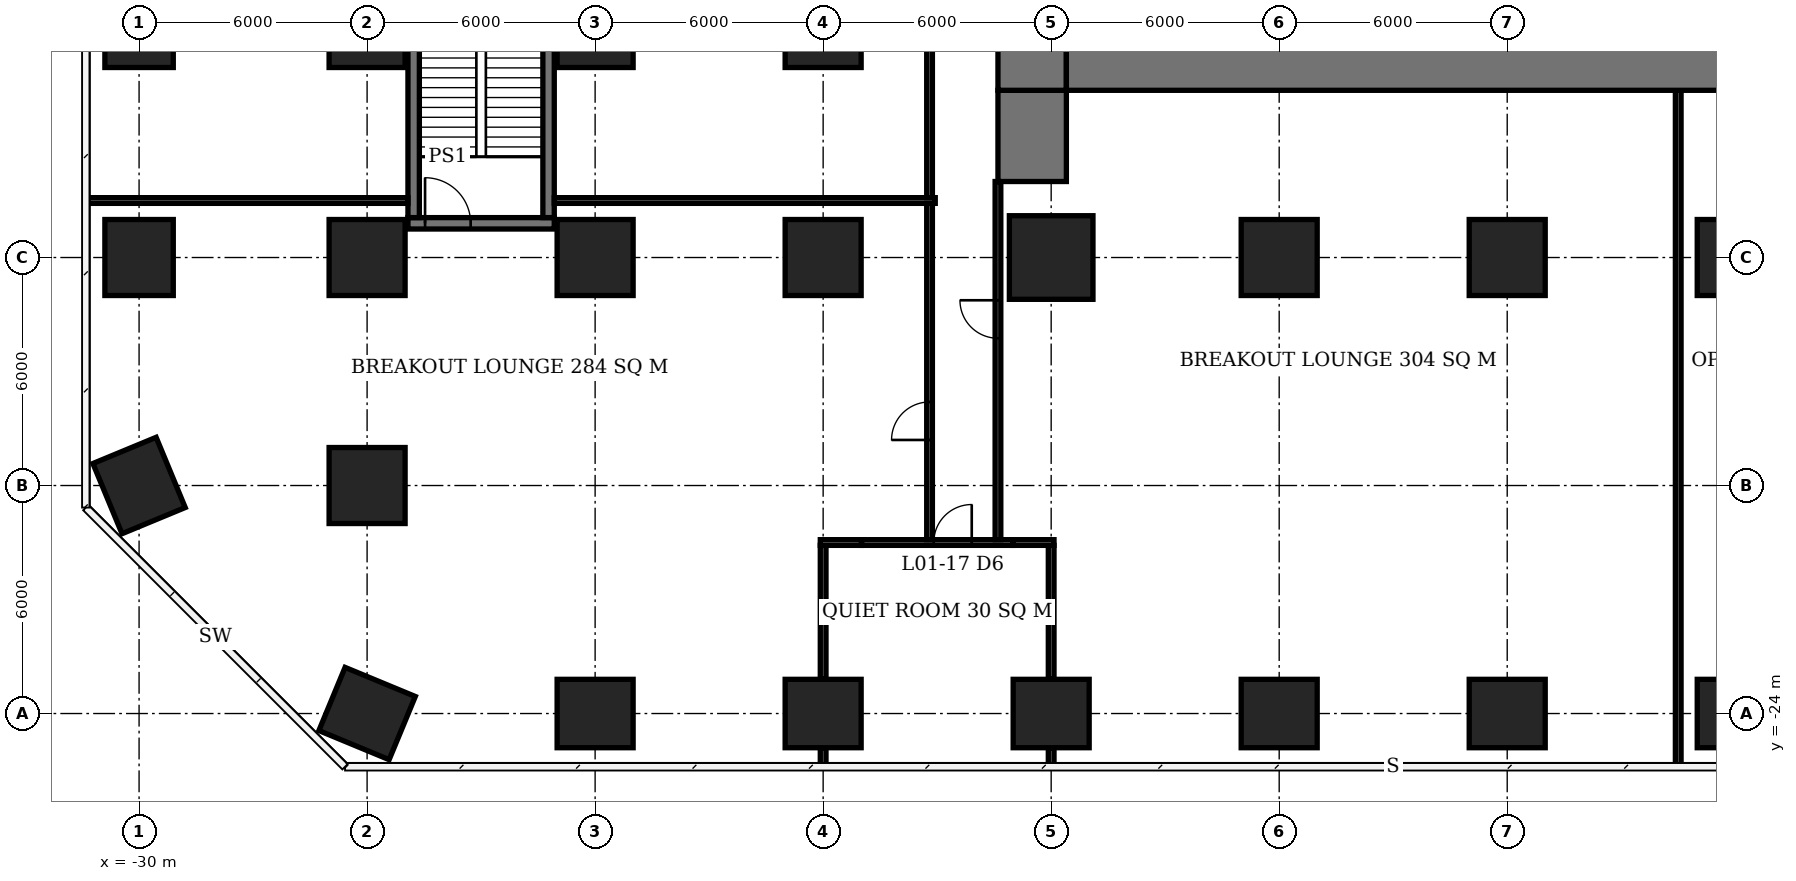
"""IFC4 building model, lengths in metres.
Left out: names, types, materials, properties, quantities, classifications, styles, units other than length and angle.
Written with IfcOpenShell. Run it as: python <this file> out.ifc"""

import sys

from ifc_helpers import new_model, si_unit, direction, frame, frame_2d, origin, origin_2d, place, context, subcontext, project, spatial, rectangle, extrude, element, fill, save


model = new_model("IFC4")
c1 = context("Model", 3, precision=1e-05, world=origin(), true_north=direction((0.0, 1.0)))
c2 = subcontext(c1, "Body", "Model", "MODEL_VIEW")
j1 = project(units=[si_unit("LENGTHUNIT", "METRE"), si_unit("PLANEANGLEUNIT", "RADIAN")], contexts=[c1])
p1 = place(None, origin())
s1 = spatial("IfcSite", under=j1, at=p1, CompositionType="ELEMENT")
p2 = place(p1, origin())
s2 = spatial("IfcBuilding", under=s1, at=p2, CompositionType="ELEMENT")
p3 = place(p2, frame((0.0, 0.0, 6.0)))
s3 = spatial("IfcBuildingStorey", under=s2, at=p3, CompositionType="ELEMENT", Elevation=6.0)
for number, where, z_axis, x_axis in (
    (1, (-30.0, -18.0, 0.0), (0.0, 0.0, 1.0), (-0.383, 0.924, 0.0)),
    (2, (-30.0, -12.0, 0.0), (0.0, 0.0, 1.0), (0.0, 1.0, 0.0)),
    (3, (-30.0, -6.0, 0.0), (0.0, 0.0, 1.0), (0.0, 1.0, 0.0)),
    (4, (-24.0, -24.0, 0.0), (0.0, 0.0, 1.0), (-0.924, 0.383, 0.0)),
):
    element("IfcColumn", number, at=place(p3, frame(where, z_axis=z_axis, x_axis=x_axis)), inside=s3, PredefinedType="COLUMN", context=c2, shape_type="SweptSolid", body=[
        extrude(rectangle(XDim=2.0, YDim=1.8, at=origin_2d()), origin(), (0.0, 0.0, 1.0), 5.0),
    ])
for number, where, z_axis, x_axis in (
    (5, (-24.0, -18.0, 0.0), (0.0, 0.0, 1.0), (1.0, 0.0, 0.0)),
    (6, (-24.0, -12.0, 0.0), (0.0, 0.0, 1.0), (1.0, 0.0, 0.0)),
    (7, (-24.0, -6.0, 0.0), (0.0, 0.0, 1.0), (1.0, 0.0, 0.0)),
):
    element("IfcColumn", number, at=place(p3, frame(where, z_axis=z_axis, x_axis=x_axis)), inside=s3, PredefinedType="COLUMN", context=c2, shape_type="SweptSolid", body=[
        extrude(rectangle(XDim=2.0, YDim=2.0, at=origin_2d()), origin(), (0.0, 0.0, 1.0), 5.0),
    ])
p4 = place(p3, frame((-18.0, -24.0, 0.0), z_axis=(0.0, 0.0, 1.0), x_axis=(1.0, 0.0, 0.0)))
e8 = element("IfcColumn", 8, at=p4, inside=s3, PredefinedType="COLUMN", context=c2, shape_type="SweptSolid", body=[
    extrude(rectangle(XDim=2.0, YDim=1.8, at=origin_2d()), origin(), (0.0, 0.0, 1.0), 5.0),
])
for number, where, z_axis, x_axis in (
    (9, (-18.0, -12.0, 0.0), (0.0, 0.0, 1.0), (1.0, 0.0, 0.0)),
    (10, (-18.0, -6.0, 0.0), (0.0, 0.0, 1.0), (1.0, 0.0, 0.0)),
):
    element("IfcColumn", number, at=place(p3, frame(where, z_axis=z_axis, x_axis=x_axis)), inside=s3, PredefinedType="COLUMN", context=c2, shape_type="SweptSolid", body=[
        extrude(rectangle(XDim=2.0, YDim=2.0, at=origin_2d()), origin(), (0.0, 0.0, 1.0), 5.0),
    ])
p5 = place(p3, frame((-12.0, -24.0, 0.0), z_axis=(0.0, 0.0, 1.0), x_axis=(1.0, 0.0, 0.0)))
e11 = element("IfcColumn", 11, at=p5, inside=s3, PredefinedType="COLUMN", context=c2, shape_type="SweptSolid", body=[
    extrude(rectangle(XDim=2.0, YDim=1.8, at=origin_2d()), origin(), (0.0, 0.0, 1.0), 5.0),
])
for number, where, z_axis, x_axis in (
    (12, (-12.0, -12.0, 0.0), (0.0, 0.0, 1.0), (1.0, 0.0, 0.0)),
    (13, (-12.0, -6.0, 0.0), (0.0, 0.0, 1.0), (1.0, 0.0, 0.0)),
):
    element("IfcColumn", number, at=place(p3, frame(where, z_axis=z_axis, x_axis=x_axis)), inside=s3, PredefinedType="COLUMN", context=c2, shape_type="SweptSolid", body=[
        extrude(rectangle(XDim=2.0, YDim=2.0, at=origin_2d()), origin(), (0.0, 0.0, 1.0), 5.0),
    ])
p6 = place(p3, frame((-6.0, -24.0, 0.0), z_axis=(0.0, 0.0, 1.0), x_axis=(1.0, 0.0, 0.0)))
e14 = element("IfcColumn", 14, at=p6, inside=s3, PredefinedType="COLUMN", context=c2, shape_type="SweptSolid", body=[
    extrude(rectangle(XDim=2.0, YDim=1.8, at=origin_2d()), origin(), (0.0, 0.0, 1.0), 5.0),
])
p7 = place(p3, frame((-6.0, -12.0, 0.0), z_axis=(0.0, 0.0, 1.0), x_axis=(1.0, 0.0, 0.0)))
e15 = element("IfcColumn", 15, at=p7, inside=s3, PredefinedType="COLUMN", context=c2, shape_type="SweptSolid", body=[
    extrude(rectangle(XDim=2.2, YDim=2.2, at=origin_2d()), origin(), (0.0, 0.0, 1.0), 5.0),
])
p8 = place(p3, frame((0.0, -24.0, 0.0), z_axis=(0.0, 0.0, 1.0), x_axis=(1.0, 0.0, 0.0)))
e16 = element("IfcColumn", 16, at=p8, inside=s3, PredefinedType="COLUMN", context=c2, shape_type="SweptSolid", body=[
    extrude(rectangle(XDim=2.0, YDim=1.8, at=origin_2d()), origin(), (0.0, 0.0, 1.0), 5.0),
])
p9 = place(p3, frame((0.0, -12.0, 0.0), z_axis=(0.0, 0.0, 1.0), x_axis=(1.0, 0.0, 0.0)))
e17 = element("IfcColumn", 17, at=p9, inside=s3, PredefinedType="COLUMN", context=c2, shape_type="SweptSolid", body=[
    extrude(rectangle(XDim=2.0, YDim=2.0, at=origin_2d()), origin(), (0.0, 0.0, 1.0), 5.0),
])
p10 = place(p3, frame((6.0, -24.0, 0.0), z_axis=(0.0, 0.0, 1.0), x_axis=(1.0, 0.0, 0.0)))
e18 = element("IfcColumn", 18, at=p10, inside=s3, PredefinedType="COLUMN", context=c2, shape_type="SweptSolid", body=[
    extrude(rectangle(XDim=2.0, YDim=1.8, at=origin_2d()), origin(), (0.0, 0.0, 1.0), 5.0),
])
p11 = place(p3, frame((6.0, -12.0, 0.0), z_axis=(0.0, 0.0, 1.0), x_axis=(1.0, 0.0, 0.0)))
e19 = element("IfcColumn", 19, at=p11, inside=s3, PredefinedType="COLUMN", context=c2, shape_type="SweptSolid", body=[
    extrude(rectangle(XDim=2.0, YDim=2.0, at=origin_2d()), origin(), (0.0, 0.0, 1.0), 5.0),
])
p12 = place(p3, frame((12.0, -24.0, 0.0), z_axis=(0.0, 0.0, 1.0), x_axis=(1.0, 0.0, 0.0)))
e20 = element("IfcColumn", 20, at=p12, inside=s3, PredefinedType="COLUMN", context=c2, shape_type="SweptSolid", body=[
    extrude(rectangle(XDim=2.0, YDim=1.8, at=origin_2d()), origin(), (0.0, 0.0, 1.0), 5.0),
])
p13 = place(p3, frame((12.0, -12.0, 0.0), z_axis=(0.0, 0.0, 1.0), x_axis=(1.0, 0.0, 0.0)))
e21 = element("IfcColumn", 21, at=p13, inside=s3, PredefinedType="COLUMN", context=c2, shape_type="SweptSolid", body=[
    extrude(rectangle(XDim=2.0, YDim=2.0, at=origin_2d()), origin(), (0.0, 0.0, 1.0), 5.0),
])
p14 = place(p3, frame((-5.6, -6.6, 0.0), z_axis=(0.0, 0.0, 1.0), x_axis=(1.0, 0.0, 0.0)))
e22 = element("IfcWall", 22, at=p14, inside=s3, PredefinedType="SHEAR", context=c2, shape_type="SweptSolid", body=[
    extrude(rectangle(XDim=23.2, YDim=2.0, at=frame_2d((11.6, 0.0))), origin(), (0.0, 0.0, 1.0), 5.0),
])
p15 = place(p3, frame((-6.5, -7.6, 0.0), z_axis=(0.0, 0.0, 1.0), x_axis=(0.0, 1.0, 0.0)))
e23 = element("IfcWall", 23, at=p15, inside=s3, PredefinedType="SHEAR", context=c2, shape_type="SweptSolid", body=[
    extrude(rectangle(XDim=21.2, YDim=1.8, at=frame_2d((10.6, 0.0))), origin(), (0.0, 0.0, 1.0), 5.0),
])
p16 = place(p15, frame((7.8, 0.0, 0.0)))
e24 = element("IfcOpeningElement", 24, at=p16, cuts=e23, PredefinedType="OPENING", context=c2, shape_type="SweptSolid", body=[
    extrude(rectangle(XDim=1.8, YDim=2.4, at=frame_2d((0.9, 1.2))), frame((0.0, 0.91, 0.0), z_axis=(0.0, -1.0, 0.0), x_axis=(1.0, 0.0, 0.0)), (0.0, 0.0, 1.0), 1.82),
])
p17 = place(p3, frame((-6.5, -10.0, 0.0), z_axis=(0.0, 0.0, 1.0), x_axis=(0.0, 1.0, 0.0)))
e25 = element("IfcWall", 25, at=p17, inside=s3, PredefinedType="SHEAR", context=c2, shape_type="SweptSolid", body=[
    extrude(rectangle(XDim=2.4, YDim=1.8, at=frame_2d((1.2, 0.0))), origin(), (0.0, 0.0, 1.0), 5.0),
])
p18 = place(p3, frame((-22.925, -11.1, 0.0), z_axis=(0.0, 0.0, 1.0), x_axis=(1.0, 0.0, 0.0)))
e26 = element("IfcWall", 26, at=p18, inside=s3, PredefinedType="SOLIDWALL", context=c2, shape_type="SweptSolid", body=[
    extrude(rectangle(XDim=3.85, YDim=0.3, at=frame_2d((1.925, 0.0))), origin(), (0.0, 0.0, 1.0), 4.75),
])
p19 = place(p18, frame((0.45, 0.0, 0.0)))
e27 = element("IfcOpeningElement", 27, at=p19, cuts=e26, PredefinedType="OPENING", context=c2, shape_type="SweptSolid", body=[
    extrude(rectangle(XDim=1.2, YDim=2.1, at=frame_2d((0.6, 1.05))), frame((0.0, 0.16, 0.0), z_axis=(0.0, -1.0, 0.0), x_axis=(1.0, 0.0, 0.0)), (0.0, 0.0, 1.0), 0.32),
])
for number, where, z_axis, x_axis in (
    (28, (-22.775, -10.95, 0.0), (0.0, 0.0, 1.0), (0.0, 1.0, 0.0)),
    (29, (-19.225, -10.95, 0.0), (0.0, 0.0, 1.0), (0.0, 1.0, 0.0)),
):
    element("IfcWall", number, at=place(p3, frame(where, z_axis=z_axis, x_axis=x_axis)), inside=s3, PredefinedType="SOLIDWALL", context=c2, shape_type="SweptSolid", body=[
        extrude(rectangle(XDim=9.9, YDim=0.3, at=frame_2d((4.95, 0.0))), origin(), (0.0, 0.0, 1.0), 4.75),
    ])
p20 = place(p3, frame((-12.075, -19.5, 0.0), z_axis=(0.0, 0.0, 1.0), x_axis=(1.0, 0.0, 0.0)))
e30 = element("IfcWall", 30, at=p20, inside=s3, PredefinedType="PARTITIONING", context=c2, shape_type="SweptSolid", body=[
    extrude(rectangle(XDim=1.085, YDim=0.15, at=frame_2d((0.542, 0.0))), origin(), (0.0, 0.0, 1.0), 3.75),
])
p21 = place(p3, frame((-10.99, -19.5, 0.0), z_axis=(0.0, 0.0, 1.0), x_axis=(1.0, 0.0, 0.0)))
e31 = element("IfcWall", 31, at=p21, inside=s3, PredefinedType="PARTITIONING", context=c2, shape_type="SweptSolid", body=[
    extrude(rectangle(XDim=3.98, YDim=0.15, at=frame_2d((1.99, 0.0))), origin(), (0.0, 0.0, 1.0), 4.75),
])
p22 = place(p21, frame((1.9, 0.0, 0.0)))
e32 = element("IfcOpeningElement", 32, at=p22, cuts=e31, PredefinedType="OPENING", context=c2, shape_type="SweptSolid", body=[
    extrude(rectangle(XDim=1.0, YDim=2.1, at=frame_2d((0.5, 1.05))), frame((0.0, 0.085, 0.0), z_axis=(0.0, -1.0, 0.0), x_axis=(1.0, 0.0, 0.0)), (0.0, 0.0, 1.0), 0.17),
])
p23 = place(p3, frame((-7.01, -19.5, 0.0), z_axis=(0.0, 0.0, 1.0), x_axis=(1.0, 0.0, 0.0)))
e33 = element("IfcWall", 33, at=p23, inside=s3, PredefinedType="PARTITIONING", context=c2, shape_type="SweptSolid", body=[
    extrude(rectangle(XDim=1.085, YDim=0.15, at=frame_2d((0.542, 0.0))), origin(), (0.0, 0.0, 1.0), 3.75),
])
p24 = place(p3, frame((-12.0, -25.375, 0.0), z_axis=(0.0, 0.0, 1.0), x_axis=(0.0, 1.0, 0.0)))
e34 = element("IfcWall", 34, at=p24, inside=s3, PredefinedType="PARTITIONING", context=c2, shape_type="SweptSolid", body=[
    extrude(rectangle(XDim=0.475, YDim=0.15, at=frame_2d((0.238, 0.0))), origin(), (0.0, 0.0, 1.0), 4.75),
])
p25 = place(p3, frame((-12.0, -23.1, 0.0), z_axis=(0.0, 0.0, 1.0), x_axis=(0.0, 1.0, 0.0)))
e35 = element("IfcWall", 35, at=p25, inside=s3, PredefinedType="PARTITIONING", context=c2, shape_type="SweptSolid", body=[
    extrude(rectangle(XDim=3.525, YDim=0.15, at=frame_2d((1.763, 0.0))), origin(), (0.0, 0.0, 1.0), 3.75),
])
p26 = place(p3, frame((-6.0, -25.375, 0.0), z_axis=(0.0, 0.0, 1.0), x_axis=(0.0, 1.0, 0.0)))
e36 = element("IfcWall", 36, at=p26, inside=s3, PredefinedType="PARTITIONING", context=c2, shape_type="SweptSolid", body=[
    extrude(rectangle(XDim=0.475, YDim=0.15, at=frame_2d((0.238, 0.0))), origin(), (0.0, 0.0, 1.0), 4.75),
])
p27 = place(p3, frame((-6.0, -23.1, 0.0), z_axis=(0.0, 0.0, 1.0), x_axis=(0.0, 1.0, 0.0)))
e37 = element("IfcWall", 37, at=p27, inside=s3, PredefinedType="PARTITIONING", context=c2, shape_type="SweptSolid", body=[
    extrude(rectangle(XDim=3.525, YDim=0.15, at=frame_2d((1.763, 0.0))), origin(), (0.0, 0.0, 1.0), 3.75),
])
p28 = place(p3, frame((-31.375, -10.5, 0.0), z_axis=(0.0, 0.0, 1.0), x_axis=(1.0, 0.0, 0.0)))
e38 = element("IfcWall", 38, at=p28, inside=s3, PredefinedType="PARTITIONING", context=c2, shape_type="SweptSolid", body=[
    extrude(rectangle(XDim=8.45, YDim=0.15, at=frame_2d((4.225, 0.0))), origin(), (0.0, 0.0, 1.0), 4.75),
])
p29 = place(p3, frame((-19.075, -10.5, 0.0), z_axis=(0.0, 0.0, 1.0), x_axis=(1.0, 0.0, 0.0)))
e39 = element("IfcWall", 39, at=p29, inside=s3, PredefinedType="PARTITIONING", context=c2, shape_type="SweptSolid", body=[
    extrude(rectangle(XDim=10.025, YDim=0.15, at=frame_2d((5.012, 0.0))), origin(), (0.0, 0.0, 1.0), 4.75),
])
p30 = place(p3, frame((-9.2, -19.425, 0.0), z_axis=(0.0, 0.0, 1.0), x_axis=(0.0, 1.0, 0.0)))
e40 = element("IfcWall", 40, at=p30, inside=s3, PredefinedType="PARTITIONING", context=c2, shape_type="SweptSolid", body=[
    extrude(rectangle(XDim=8.85, YDim=0.15, at=frame_2d((4.425, 0.0))), origin(), (0.0, 0.0, 1.0), 4.75),
])
p31 = place(p30, frame((2.624, 0.0, 0.0)))
e41 = element("IfcOpeningElement", 41, at=p31, cuts=e40, PredefinedType="OPENING", context=c2, shape_type="SweptSolid", body=[
    extrude(rectangle(XDim=1.0, YDim=2.1, at=frame_2d((0.5, 1.05))), frame((0.0, 0.085, 0.0), z_axis=(0.0, -1.0, 0.0), x_axis=(1.0, 0.0, 0.0)), (0.0, 0.0, 1.0), 0.17),
])
p32 = place(p3, frame((-9.2, -10.425, 0.0), z_axis=(0.0, 0.0, 1.0), x_axis=(0.0, 1.0, 0.0)))
e42 = element("IfcWall", 42, at=p32, inside=s3, PredefinedType="PARTITIONING", context=c2, shape_type="SweptSolid", body=[
    extrude(rectangle(XDim=17.85, YDim=0.15, at=frame_2d((8.925, 0.0))), origin(), (0.0, 0.0, 1.0), 4.75),
])
p33 = place(p32, frame((5.725, 0.0, 0.0)))
e43 = element("IfcOpeningElement", 43, at=p33, cuts=e42, PredefinedType="OPENING", context=c2, shape_type="SweptSolid", body=[
    extrude(rectangle(XDim=1.0, YDim=2.1, at=frame_2d((0.5, 1.05))), frame((0.0, 0.085, 0.0), z_axis=(0.0, -1.0, 0.0), x_axis=(1.0, 0.0, 0.0)), (0.0, 0.0, 1.0), 0.17),
])
p34 = place(p3, frame((-7.4, -19.425, 0.0), z_axis=(0.0, 0.0, 1.0), x_axis=(0.0, 1.0, 0.0)))
e44 = element("IfcWall", 44, at=p34, inside=s3, PredefinedType="PARTITIONING", context=c2, shape_type="SweptSolid", body=[
    extrude(rectangle(XDim=9.425, YDim=0.15, at=frame_2d((4.712, 0.0))), origin(), (0.0, 0.0, 1.0), 4.75),
])
p35 = place(p34, frame((5.3, 0.0, 0.0)))
e45 = element("IfcOpeningElement", 45, at=p35, cuts=e44, PredefinedType="OPENING", context=c2, shape_type="SweptSolid", body=[
    extrude(rectangle(XDim=1.0, YDim=2.1, at=frame_2d((0.5, 1.05))), frame((0.0, 0.085, 0.0), z_axis=(0.0, -1.0, 0.0), x_axis=(1.0, 0.0, 0.0)), (0.0, 0.0, 1.0), 0.17),
])
p36 = place(p3, frame((10.5, -25.375, 0.0), z_axis=(0.0, 0.0, 1.0), x_axis=(0.0, 1.0, 0.0)))
e46 = element("IfcWall", 46, at=p36, inside=s3, PredefinedType="PARTITIONING", context=c2, shape_type="SweptSolid", body=[
    extrude(rectangle(XDim=17.775, YDim=0.15, at=frame_2d((8.887, 0.0))), origin(), (0.0, 0.0, 1.0), 4.75),
])
p37 = place(p19, origin())
e47 = element("IfcDoor", 47, at=p37, inside=s3, OperationType="SINGLE_SWING_LEFT", PredefinedType="DOOR", context=c2, shape_type="SweptSolid", body=[
    extrude(rectangle(XDim=1.2, YDim=2.1, at=frame_2d((0.6, 1.05))), frame((0.0, 0.025, 0.0), z_axis=(0.0, -1.0, 0.0), x_axis=(1.0, 0.0, 0.0)), (0.0, 0.0, 1.0), 0.05),
])
fill(e27, e47)
p38 = place(p22, origin())
e48 = element("IfcDoor", 48, at=p38, inside=s3, OperationType="SINGLE_SWING_RIGHT", PredefinedType="DOOR", context=c2, shape_type="SweptSolid", body=[
    extrude(rectangle(XDim=1.0, YDim=2.1, at=frame_2d((0.5, 1.05))), frame((0.0, 0.025, 0.0), z_axis=(0.0, -1.0, 0.0), x_axis=(1.0, 0.0, 0.0)), (0.0, 0.0, 1.0), 0.05),
])
fill(e32, e48)
p39 = place(p31, origin())
e49 = element("IfcDoor", 49, at=p39, inside=s3, OperationType="SINGLE_SWING_LEFT", PredefinedType="DOOR", context=c2, shape_type="SweptSolid", body=[
    extrude(rectangle(XDim=1.0, YDim=2.1, at=frame_2d((0.5, 1.05))), frame((0.0, 0.025, 0.0), z_axis=(0.0, -1.0, 0.0), x_axis=(1.0, 0.0, 0.0)), (0.0, 0.0, 1.0), 0.05),
])
fill(e41, e49)
p40 = place(p35, origin())
e50 = element("IfcDoor", 50, at=p40, inside=s3, OperationType="SINGLE_SWING_RIGHT", PredefinedType="DOOR", context=c2, shape_type="SweptSolid", body=[
    extrude(rectangle(XDim=1.0, YDim=2.1, at=frame_2d((0.5, 1.05))), frame((0.0, 0.025, 0.0), z_axis=(0.0, -1.0, 0.0), x_axis=(1.0, 0.0, 0.0)), (0.0, 0.0, 1.0), 0.05),
])
fill(e45, e50)
save(model, sys.argv[1])
